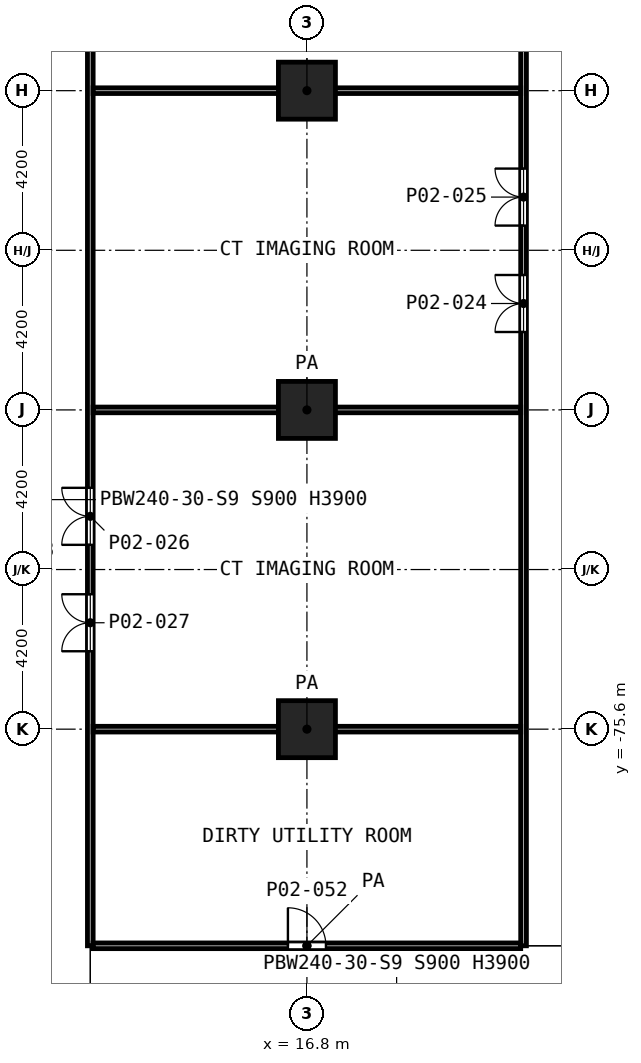
"""IFC4 building model, lengths in metres.
Left out: names, types, materials, properties, quantities, classifications, styles, units other than length and angle.
Written with IfcOpenShell. Run it as: python <this file> out.ifc"""

import sys

from ifc_helpers import new_model, si_unit, direction, frame, frame_2d, origin, origin_2d, place, context, subcontext, project, spatial, rectangle, extrude, element, fill, save


model = new_model("IFC4")
c1 = context("Model", 3, precision=1e-05, world=origin(), true_north=direction((0.0, 1.0)))
c2 = subcontext(c1, "Body", "Model", "MODEL_VIEW")
j1 = project(units=[si_unit("LENGTHUNIT", "METRE"), si_unit("PLANEANGLEUNIT", "RADIAN")], contexts=[c1])
p1 = place(None, origin())
s1 = spatial("IfcSite", under=j1, at=p1, CompositionType="ELEMENT")
p2 = place(p1, origin())
s2 = spatial("IfcBuilding", under=s1, at=p2, CompositionType="ELEMENT")
p3 = place(p2, frame((0.0, 0.0, 7.0)))
s3 = spatial("IfcBuildingStorey", under=s2, at=p3, CompositionType="ELEMENT", Elevation=7.0)
for number, where, z_axis, x_axis in (
    (1, (16.8, -58.8, 0.0), (0.0, 0.0, 1.0), (1.0, 0.0, 0.0)),
    (2, (16.8, -67.2, 0.0), (0.0, 0.0, 1.0), (1.0, 0.0, 0.0)),
    (3, (16.8, -75.6, 0.0), (0.0, 0.0, 1.0), (1.0, 0.0, 0.0)),
):
    element("IfcColumn", number, at=place(p3, frame(where, z_axis=z_axis, x_axis=x_axis)), inside=s3, PredefinedType="COLUMN", context=c2, shape_type="SweptSolid", body=[
        extrude(rectangle(XDim=1.5, YDim=1.5, at=origin_2d()), origin(), (0.0, 0.0, 1.0), 5.6),
    ])
p4 = place(p3, frame((11.175, -81.3, 0.0), z_axis=(0.0, 0.0, 1.0), x_axis=(1.0, 0.0, 0.0)))
e4 = element("IfcWall", 4, at=p4, inside=s3, PredefinedType="PARTITIONING", context=c2, shape_type="SweptSolid", body=[
    extrude(rectangle(XDim=11.25, YDim=0.15, at=frame_2d((5.625, 0.0))), origin(), (0.0, 0.0, 1.0), 5.25),
])
p5 = place(p4, frame((5.125, 0.0, 0.0)))
e5 = element("IfcOpeningElement", 5, at=p5, cuts=e4, PredefinedType="OPENING", context=c2, shape_type="SweptSolid", body=[
    extrude(rectangle(XDim=1.0, YDim=2.1, at=frame_2d((0.5, 1.05))), frame((0.0, 0.085, 0.0), z_axis=(0.0, -1.0, 0.0), x_axis=(1.0, 0.0, 0.0)), (0.0, 0.0, 1.0), 0.17),
])
for number, where, z_axis, x_axis in (
    (6, (11.175, -75.6, 0.0), (0.0, 0.0, 1.0), (1.0, 0.0, 0.0)),
    (7, (11.175, -67.2, 0.0), (0.0, 0.0, 1.0), (1.0, 0.0, 0.0)),
    (8, (11.175, -58.8, 0.0), (0.0, 0.0, 1.0), (1.0, 0.0, 0.0)),
):
    element("IfcWall", number, at=place(p3, frame(where, z_axis=z_axis, x_axis=x_axis)), inside=s3, PredefinedType="PARTITIONING", context=c2, shape_type="SweptSolid", body=[
        extrude(rectangle(XDim=11.25, YDim=0.15, at=frame_2d((5.625, 0.0))), origin(), (0.0, 0.0, 1.0), 5.25),
    ])
p6 = place(p3, frame((11.1, -81.3, 0.0), z_axis=(0.0, 0.0, 1.0), x_axis=(0.0, 1.0, 0.0)))
e9 = element("IfcWall", 9, at=p6, inside=s3, PredefinedType="PARTITIONING", context=c2, shape_type="SweptSolid", body=[
    extrude(rectangle(XDim=51.9, YDim=0.15, at=frame_2d((25.95, 0.0))), origin(), (0.0, 0.0, 1.0), 5.25),
])
p7 = place(p6, frame((35.75, 0.0, 0.0)))
e10 = element("IfcOpeningElement", 10, at=p7, cuts=e9, PredefinedType="OPENING", context=c2, shape_type="SweptSolid", body=[
    extrude(rectangle(XDim=1.5, YDim=2.1, at=frame_2d((0.75, 1.05))), frame((0.0, 0.085, 0.0), z_axis=(0.0, -1.0, 0.0), x_axis=(1.0, 0.0, 0.0)), (0.0, 0.0, 1.0), 0.17),
])
p8 = place(p6, frame((32.95, 0.0, 0.0)))
e11 = element("IfcOpeningElement", 11, at=p8, cuts=e9, PredefinedType="OPENING", context=c2, shape_type="SweptSolid", body=[
    extrude(rectangle(XDim=1.5, YDim=2.1, at=frame_2d((0.75, 1.05))), frame((0.0, 0.085, 0.0), z_axis=(0.0, -1.0, 0.0), x_axis=(1.0, 0.0, 0.0)), (0.0, 0.0, 1.0), 0.17),
])
p9 = place(p6, frame((27.35, 0.0, 0.0)))
e12 = element("IfcOpeningElement", 12, at=p9, cuts=e9, PredefinedType="OPENING", context=c2, shape_type="SweptSolid", body=[
    extrude(rectangle(XDim=1.5, YDim=2.1, at=frame_2d((0.75, 1.05))), frame((0.0, 0.085, 0.0), z_axis=(0.0, -1.0, 0.0), x_axis=(1.0, 0.0, 0.0)), (0.0, 0.0, 1.0), 0.17),
])
p10 = place(p6, frame((24.55, 0.0, 0.0)))
e13 = element("IfcOpeningElement", 13, at=p10, cuts=e9, PredefinedType="OPENING", context=c2, shape_type="SweptSolid", body=[
    extrude(rectangle(XDim=1.5, YDim=2.1, at=frame_2d((0.75, 1.05))), frame((0.0, 0.085, 0.0), z_axis=(0.0, -1.0, 0.0), x_axis=(1.0, 0.0, 0.0)), (0.0, 0.0, 1.0), 0.17),
])
p11 = place(p6, frame((10.55, 0.0, 0.0)))
e14 = element("IfcOpeningElement", 14, at=p11, cuts=e9, PredefinedType="OPENING", context=c2, shape_type="SweptSolid", body=[
    extrude(rectangle(XDim=1.5, YDim=2.1, at=frame_2d((0.75, 1.05))), frame((0.0, 0.085, 0.0), z_axis=(0.0, -1.0, 0.0), x_axis=(1.0, 0.0, 0.0)), (0.0, 0.0, 1.0), 0.17),
])
p12 = place(p6, frame((7.75, 0.0, 0.0)))
e15 = element("IfcOpeningElement", 15, at=p12, cuts=e9, PredefinedType="OPENING", context=c2, shape_type="SweptSolid", body=[
    extrude(rectangle(XDim=1.5, YDim=2.1, at=frame_2d((0.75, 1.05))), frame((0.0, 0.085, 0.0), z_axis=(0.0, -1.0, 0.0), x_axis=(1.0, 0.0, 0.0)), (0.0, 0.0, 1.0), 0.17),
])
p13 = place(p3, frame((22.5, -81.3, 0.0), z_axis=(0.0, 0.0, 1.0), x_axis=(0.0, 1.0, 0.0)))
e16 = element("IfcWall", 16, at=p13, inside=s3, PredefinedType="PARTITIONING", context=c2, shape_type="SweptSolid", body=[
    extrude(rectangle(XDim=56.1, YDim=0.15, at=frame_2d((28.05, 0.0))), origin(), (0.0, 0.0, 1.0), 5.25),
])
p14 = place(p13, frame((49.75, 0.0, 0.0)))
e17 = element("IfcOpeningElement", 17, at=p14, cuts=e16, PredefinedType="OPENING", context=c2, shape_type="SweptSolid", body=[
    extrude(rectangle(XDim=1.5, YDim=2.1, at=frame_2d((0.75, 1.05))), frame((0.0, 0.085, 0.0), z_axis=(0.0, -1.0, 0.0), x_axis=(1.0, 0.0, 0.0)), (0.0, 0.0, 1.0), 0.17),
])
p15 = place(p13, frame((52.55, 0.0, 0.0)))
e18 = element("IfcOpeningElement", 18, at=p15, cuts=e16, PredefinedType="OPENING", context=c2, shape_type="SweptSolid", body=[
    extrude(rectangle(XDim=1.5, YDim=2.1, at=frame_2d((0.75, 1.05))), frame((0.0, 0.085, 0.0), z_axis=(0.0, -1.0, 0.0), x_axis=(1.0, 0.0, 0.0)), (0.0, 0.0, 1.0), 0.17),
])
p16 = place(p13, frame((41.35, 0.0, 0.0)))
e19 = element("IfcOpeningElement", 19, at=p16, cuts=e16, PredefinedType="OPENING", context=c2, shape_type="SweptSolid", body=[
    extrude(rectangle(XDim=1.5, YDim=2.1, at=frame_2d((0.75, 1.05))), frame((0.0, 0.085, 0.0), z_axis=(0.0, -1.0, 0.0), x_axis=(1.0, 0.0, 0.0)), (0.0, 0.0, 1.0), 0.17),
])
p17 = place(p13, frame((44.15, 0.0, 0.0)))
e20 = element("IfcOpeningElement", 20, at=p17, cuts=e16, PredefinedType="OPENING", context=c2, shape_type="SweptSolid", body=[
    extrude(rectangle(XDim=1.5, YDim=2.1, at=frame_2d((0.75, 1.05))), frame((0.0, 0.085, 0.0), z_axis=(0.0, -1.0, 0.0), x_axis=(1.0, 0.0, 0.0)), (0.0, 0.0, 1.0), 0.17),
])
p18 = place(p13, frame((16.15, 0.0, 0.0)))
e21 = element("IfcOpeningElement", 21, at=p18, cuts=e16, PredefinedType="OPENING", context=c2, shape_type="SweptSolid", body=[
    extrude(rectangle(XDim=1.5, YDim=2.1, at=frame_2d((0.75, 1.05))), frame((0.0, 0.085, 0.0), z_axis=(0.0, -1.0, 0.0), x_axis=(1.0, 0.0, 0.0)), (0.0, 0.0, 1.0), 0.17),
])
p19 = place(p13, frame((18.95, 0.0, 0.0)))
e22 = element("IfcOpeningElement", 22, at=p19, cuts=e16, PredefinedType="OPENING", context=c2, shape_type="SweptSolid", body=[
    extrude(rectangle(XDim=1.5, YDim=2.1, at=frame_2d((0.75, 1.05))), frame((0.0, 0.085, 0.0), z_axis=(0.0, -1.0, 0.0), x_axis=(1.0, 0.0, 0.0)), (0.0, 0.0, 1.0), 0.17),
])
p20 = place(p18, origin())
e23 = element("IfcDoor", 23, at=p20, inside=s3, OperationType="DOUBLE_DOOR_SINGLE_SWING", PredefinedType="DOOR", context=c2, shape_type="SweptSolid", body=[
    extrude(rectangle(XDim=1.5, YDim=2.1, at=frame_2d((0.75, 1.05))), frame((0.0, 0.025, 0.0), z_axis=(0.0, -1.0, 0.0), x_axis=(1.0, 0.0, 0.0)), (0.0, 0.0, 1.0), 0.05),
])
fill(e21, e23)
p21 = place(p19, origin())
e24 = element("IfcDoor", 24, at=p21, inside=s3, OperationType="DOUBLE_DOOR_SINGLE_SWING", PredefinedType="DOOR", context=c2, shape_type="SweptSolid", body=[
    extrude(rectangle(XDim=1.5, YDim=2.1, at=frame_2d((0.75, 1.05))), frame((0.0, 0.025, 0.0), z_axis=(0.0, -1.0, 0.0), x_axis=(1.0, 0.0, 0.0)), (0.0, 0.0, 1.0), 0.05),
])
fill(e22, e24)
p22 = place(p11, origin())
e25 = element("IfcDoor", 25, at=p22, inside=s3, OperationType="DOUBLE_DOOR_SINGLE_SWING", PredefinedType="DOOR", context=c2, shape_type="SweptSolid", body=[
    extrude(rectangle(XDim=1.5, YDim=2.1, at=frame_2d((0.75, 1.05))), frame((0.0, 0.025, 0.0), z_axis=(0.0, -1.0, 0.0), x_axis=(1.0, 0.0, 0.0)), (0.0, 0.0, 1.0), 0.05),
])
fill(e14, e25)
p23 = place(p12, origin())
e26 = element("IfcDoor", 26, at=p23, inside=s3, OperationType="DOUBLE_DOOR_SINGLE_SWING", PredefinedType="DOOR", context=c2, shape_type="SweptSolid", body=[
    extrude(rectangle(XDim=1.5, YDim=2.1, at=frame_2d((0.75, 1.05))), frame((0.0, 0.025, 0.0), z_axis=(0.0, -1.0, 0.0), x_axis=(1.0, 0.0, 0.0)), (0.0, 0.0, 1.0), 0.05),
])
fill(e15, e26)
p24 = place(p5, origin())
e27 = element("IfcDoor", 27, at=p24, inside=s3, OperationType="SINGLE_SWING_LEFT", PredefinedType="DOOR", context=c2, shape_type="SweptSolid", body=[
    extrude(rectangle(XDim=1.0, YDim=2.1, at=frame_2d((0.5, 1.05))), frame((0.0, 0.025, 0.0), z_axis=(0.0, -1.0, 0.0), x_axis=(1.0, 0.0, 0.0)), (0.0, 0.0, 1.0), 0.05),
])
fill(e5, e27)
save(model, sys.argv[1])
